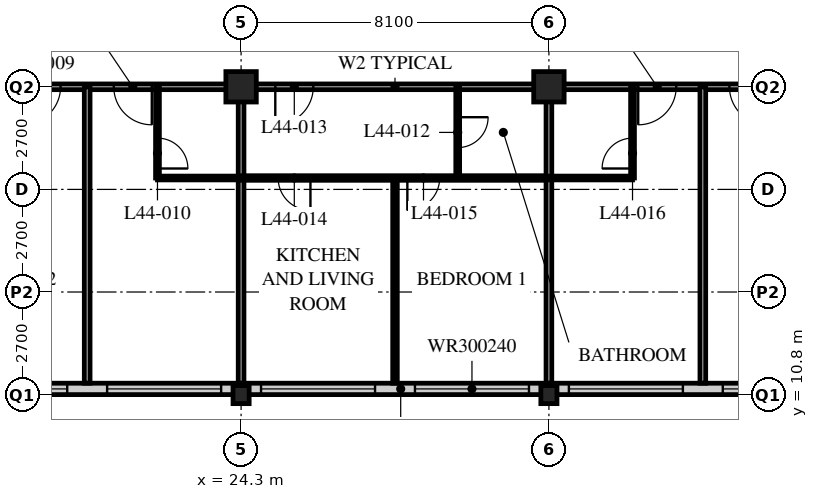
"""IFC4 building model, lengths in metres.
Left out: names, types, materials, properties, quantities, classifications, styles, units other than length and angle.
Written with IfcOpenShell. Run it as: python <this file> out.ifc"""

import sys

from ifc_helpers import new_model, si_unit, direction, frame, frame_2d, origin, origin_2d, place, context, subcontext, project, spatial, rectangle, hollow_rectangle, i_section, extrude, element, fill, save


model = new_model("IFC4")
c1 = context("Model", 3, precision=1e-05, world=origin(), true_north=direction((0.0, 1.0)))
c2 = subcontext(c1, "Body", "Model", "MODEL_VIEW")
j1 = project(units=[si_unit("LENGTHUNIT", "METRE"), si_unit("PLANEANGLEUNIT", "RADIAN")], contexts=[c1])
p1 = place(None, origin())
s1 = spatial("IfcSite", under=j1, at=p1, CompositionType="ELEMENT")
p2 = place(p1, origin())
s2 = spatial("IfcBuilding", under=s1, at=p2, CompositionType="ELEMENT")
p3 = place(p2, frame((0.0, 0.0, 174.0)))
s3 = spatial("IfcBuildingStorey", under=s2, at=p3, CompositionType="ELEMENT", Elevation=174.0)
p4 = place(p3, frame((24.3, 10.8, 0.0), z_axis=(0.0, 0.0, 1.0), x_axis=(1.0, 0.0, 0.0)))
e1 = element("IfcColumn", 1, at=p4, inside=s3, PredefinedType="COLUMN", context=c2, shape_type="SweptSolid", body=[
    extrude(i_section(OverallWidth=0.424, OverallDepth=0.475, WebThickness=0.048, FlangeThickness=0.077, FilletRadius=0.015, at=origin_2d()), origin(), (0.0, 0.0, 1.0), 3.6),
])
p5 = place(p3, frame((24.3, 18.9, 0.0), z_axis=(0.0, 0.0, 1.0), x_axis=(1.0, 0.0, 0.0)))
e2 = element("IfcColumn", 2, at=p5, inside=s3, PredefinedType="COLUMN", context=c2, shape_type="SweptSolid", body=[
    extrude(hollow_rectangle(XDim=0.8, YDim=0.8, WallThickness=0.08, at=origin_2d()), origin(), (0.0, 0.0, 1.0), 3.6),
])
p6 = place(p3, frame((32.4, 10.8, 0.0), z_axis=(0.0, 0.0, 1.0), x_axis=(1.0, 0.0, 0.0)))
e3 = element("IfcColumn", 3, at=p6, inside=s3, PredefinedType="COLUMN", context=c2, shape_type="SweptSolid", body=[
    extrude(i_section(OverallWidth=0.424, OverallDepth=0.475, WebThickness=0.048, FlangeThickness=0.077, FilletRadius=0.015, at=origin_2d()), origin(), (0.0, 0.0, 1.0), 3.6),
])
p7 = place(p3, frame((32.4, 18.9, 0.0), z_axis=(0.0, 0.0, 1.0), x_axis=(1.0, 0.0, 0.0)))
e4 = element("IfcColumn", 4, at=p7, inside=s3, PredefinedType="COLUMN", context=c2, shape_type="SweptSolid", body=[
    extrude(hollow_rectangle(XDim=0.8, YDim=0.8, WallThickness=0.08, at=origin_2d()), origin(), (0.0, 0.0, 1.0), 3.6),
])
p8 = place(p3, frame((8.4, 10.95, 0.0), z_axis=(0.0, 0.0, 1.0), x_axis=(1.0, 0.0, 0.0)))
e5 = element("IfcWall", 5, at=p8, inside=s3, PredefinedType="SOLIDWALL", context=c2, shape_type="SweptSolid", body=[
    extrude(rectangle(XDim=40.2, YDim=0.3, at=frame_2d((20.1, 0.0))), origin(), (0.0, 0.0, 1.0), 3.39),
])
p9 = place(p8, frame((0.225, 0.0, 0.6)))
e6 = element("IfcOpeningElement", 6, at=p9, cuts=e5, PredefinedType="OPENING", context=c2, shape_type="SweptSolid", body=[
    extrude(rectangle(XDim=3.0, YDim=2.4, at=frame_2d((1.5, 1.2))), frame((0.0, 0.16, 0.0), z_axis=(0.0, -1.0, 0.0), x_axis=(1.0, 0.0, 0.0)), (0.0, 0.0, 1.0), 0.32),
])
p10 = place(p8, frame((4.275, 0.0, 0.6)))
e7 = element("IfcOpeningElement", 7, at=p10, cuts=e5, PredefinedType="OPENING", context=c2, shape_type="SweptSolid", body=[
    extrude(rectangle(XDim=3.0, YDim=2.4, at=frame_2d((1.5, 1.2))), frame((0.0, 0.16, 0.0), z_axis=(0.0, -1.0, 0.0), x_axis=(1.0, 0.0, 0.0)), (0.0, 0.0, 1.0), 0.32),
])
p11 = place(p8, frame((8.325, 0.0, 0.6)))
e8 = element("IfcOpeningElement", 8, at=p11, cuts=e5, PredefinedType="OPENING", context=c2, shape_type="SweptSolid", body=[
    extrude(rectangle(XDim=3.0, YDim=2.4, at=frame_2d((1.5, 1.2))), frame((0.0, 0.16, 0.0), z_axis=(0.0, -1.0, 0.0), x_axis=(1.0, 0.0, 0.0)), (0.0, 0.0, 1.0), 0.32),
])
p12 = place(p8, frame((12.375, 0.0, 0.6)))
e9 = element("IfcOpeningElement", 9, at=p12, cuts=e5, PredefinedType="OPENING", context=c2, shape_type="SweptSolid", body=[
    extrude(rectangle(XDim=3.0, YDim=2.4, at=frame_2d((1.5, 1.2))), frame((0.0, 0.16, 0.0), z_axis=(0.0, -1.0, 0.0), x_axis=(1.0, 0.0, 0.0)), (0.0, 0.0, 1.0), 0.32),
])
p13 = place(p8, frame((16.425, 0.0, 0.6)))
e10 = element("IfcOpeningElement", 10, at=p13, cuts=e5, PredefinedType="OPENING", context=c2, shape_type="SweptSolid", body=[
    extrude(rectangle(XDim=3.0, YDim=2.4, at=frame_2d((1.5, 1.2))), frame((0.0, 0.16, 0.0), z_axis=(0.0, -1.0, 0.0), x_axis=(1.0, 0.0, 0.0)), (0.0, 0.0, 1.0), 0.32),
])
p14 = place(p8, frame((20.475, 0.0, 0.6)))
e11 = element("IfcOpeningElement", 11, at=p14, cuts=e5, PredefinedType="OPENING", context=c2, shape_type="SweptSolid", body=[
    extrude(rectangle(XDim=3.0, YDim=2.4, at=frame_2d((1.5, 1.2))), frame((0.0, 0.16, 0.0), z_axis=(0.0, -1.0, 0.0), x_axis=(1.0, 0.0, 0.0)), (0.0, 0.0, 1.0), 0.32),
])
p15 = place(p8, frame((24.525, 0.0, 0.6)))
e12 = element("IfcOpeningElement", 12, at=p15, cuts=e5, PredefinedType="OPENING", context=c2, shape_type="SweptSolid", body=[
    extrude(rectangle(XDim=3.0, YDim=2.4, at=frame_2d((1.5, 1.2))), frame((0.0, 0.16, 0.0), z_axis=(0.0, -1.0, 0.0), x_axis=(1.0, 0.0, 0.0)), (0.0, 0.0, 1.0), 0.32),
])
p16 = place(p8, frame((28.575, 0.0, 0.6)))
e13 = element("IfcOpeningElement", 13, at=p16, cuts=e5, PredefinedType="OPENING", context=c2, shape_type="SweptSolid", body=[
    extrude(rectangle(XDim=3.0, YDim=2.4, at=frame_2d((1.5, 1.2))), frame((0.0, 0.16, 0.0), z_axis=(0.0, -1.0, 0.0), x_axis=(1.0, 0.0, 0.0)), (0.0, 0.0, 1.0), 0.32),
])
p17 = place(p8, frame((32.625, 0.0, 0.6)))
e14 = element("IfcOpeningElement", 14, at=p17, cuts=e5, PredefinedType="OPENING", context=c2, shape_type="SweptSolid", body=[
    extrude(rectangle(XDim=3.0, YDim=2.4, at=frame_2d((1.5, 1.2))), frame((0.0, 0.16, 0.0), z_axis=(0.0, -1.0, 0.0), x_axis=(1.0, 0.0, 0.0)), (0.0, 0.0, 1.0), 0.32),
])
p18 = place(p8, frame((36.675, 0.0, 0.6)))
e15 = element("IfcOpeningElement", 15, at=p18, cuts=e5, PredefinedType="OPENING", context=c2, shape_type="SweptSolid", body=[
    extrude(rectangle(XDim=3.0, YDim=2.4, at=frame_2d((1.5, 1.2))), frame((0.0, 0.16, 0.0), z_axis=(0.0, -1.0, 0.0), x_axis=(1.0, 0.0, 0.0)), (0.0, 0.0, 1.0), 0.32),
])
p19 = place(p3, frame((12.15, 18.9, 0.0), z_axis=(0.0, 0.0, 1.0), x_axis=(1.0, 0.0, 0.0)))
e16 = element("IfcWall", 16, at=p19, inside=s3, PredefinedType="PARTITIONING", context=c2, shape_type="SweptSolid", body=[
    extrude(rectangle(XDim=32.4, YDim=0.15, at=frame_2d((16.2, 0.0))), origin(), (0.0, 0.0, 1.0), 2.778),
])
p20 = place(p19, frame((6.4, 0.0, 0.0)))
e17 = element("IfcOpeningElement", 17, at=p20, cuts=e16, PredefinedType="OPENING", context=c2, shape_type="SweptSolid", body=[
    extrude(rectangle(XDim=1.0, YDim=2.1, at=frame_2d((0.5, 1.05))), frame((0.0, 0.085, 0.0), z_axis=(0.0, -1.0, 0.0), x_axis=(1.0, 0.0, 0.0)), (0.0, 0.0, 1.0), 0.17),
])
p21 = place(p19, frame((8.8, 0.0, 0.0)))
e18 = element("IfcOpeningElement", 18, at=p21, cuts=e16, PredefinedType="OPENING", context=c2, shape_type="SweptSolid", body=[
    extrude(rectangle(XDim=1.0, YDim=2.1, at=frame_2d((0.5, 1.05))), frame((0.0, 0.085, 0.0), z_axis=(0.0, -1.0, 0.0), x_axis=(1.0, 0.0, 0.0)), (0.0, 0.0, 1.0), 0.17),
])
p22 = place(p19, frame((13.05, 0.0, 0.0)))
e19 = element("IfcOpeningElement", 19, at=p22, cuts=e16, PredefinedType="OPENING", context=c2, shape_type="SweptSolid", body=[
    extrude(rectangle(XDim=1.0, YDim=2.1, at=frame_2d((0.5, 1.05))), frame((0.0, 0.085, 0.0), z_axis=(0.0, -1.0, 0.0), x_axis=(1.0, 0.0, 0.0)), (0.0, 0.0, 1.0), 0.17),
])
p23 = place(p19, frame((22.6, 0.0, 0.0)))
e20 = element("IfcOpeningElement", 20, at=p23, cuts=e16, PredefinedType="OPENING", context=c2, shape_type="SweptSolid", body=[
    extrude(rectangle(XDim=1.0, YDim=2.1, at=frame_2d((0.5, 1.05))), frame((0.0, 0.085, 0.0), z_axis=(0.0, -1.0, 0.0), x_axis=(1.0, 0.0, 0.0)), (0.0, 0.0, 1.0), 0.17),
])
p24 = place(p19, frame((25.0, 0.0, 0.0)))
e21 = element("IfcOpeningElement", 21, at=p24, cuts=e16, PredefinedType="OPENING", context=c2, shape_type="SweptSolid", body=[
    extrude(rectangle(XDim=1.0, YDim=2.1, at=frame_2d((0.5, 1.05))), frame((0.0, 0.085, 0.0), z_axis=(0.0, -1.0, 0.0), x_axis=(1.0, 0.0, 0.0)), (0.0, 0.0, 1.0), 0.17),
])
p25 = place(p19, frame((1.525, 0.0, 0.0)))
e22 = element("IfcOpeningElement", 22, at=p25, cuts=e16, PredefinedType="OPENING", context=c2, shape_type="SweptSolid", body=[
    extrude(rectangle(XDim=1.0, YDim=2.1, at=frame_2d((0.5, 1.05))), frame((0.0, 0.085, 0.0), z_axis=(0.0, -1.0, 0.0), x_axis=(1.0, 0.0, 0.0)), (0.0, 0.0, 1.0), 0.17),
])
p26 = place(p19, frame((29.875, 0.0, 0.0)))
e23 = element("IfcOpeningElement", 23, at=p26, cuts=e16, PredefinedType="OPENING", context=c2, shape_type="SweptSolid", body=[
    extrude(rectangle(XDim=1.0, YDim=2.1, at=frame_2d((0.5, 1.05))), frame((0.0, 0.085, 0.0), z_axis=(0.0, -1.0, 0.0), x_axis=(1.0, 0.0, 0.0)), (0.0, 0.0, 1.0), 0.17),
])
p27 = place(p3, frame((20.25, 18.9, 0.0), z_axis=(0.0, 0.0, 1.0), x_axis=(0.0, -1.0, 0.0)))
e24 = element("IfcWall", 24, at=p27, inside=s3, PredefinedType="PARTITIONING", context=c2, shape_type="SweptSolid", body=[
    extrude(rectangle(XDim=7.8, YDim=0.15, at=frame_2d((3.9, 0.0))), origin(), (0.0, 0.0, 1.0), 3.39),
])
p28 = place(p3, frame((22.1, 16.5, 0.0), z_axis=(0.0, 0.0, 1.0), x_axis=(1.0, 0.0, 0.0)))
e25 = element("IfcWall", 25, at=p28, inside=s3, PredefinedType="PARTITIONING", context=c2, shape_type="SweptSolid", body=[
    extrude(rectangle(XDim=2.2, YDim=0.1, at=frame_2d((1.1, 0.0))), origin(), (0.0, 0.0, 1.0), 3.39),
])
p29 = place(p3, frame((22.1, 18.9, 0.0), z_axis=(0.0, 0.0, 1.0), x_axis=(0.0, -1.0, 0.0)))
e26 = element("IfcWall", 26, at=p29, inside=s3, PredefinedType="PARTITIONING", context=c2, shape_type="SweptSolid", body=[
    extrude(rectangle(XDim=2.4, YDim=0.1, at=frame_2d((1.2, 0.0))), origin(), (0.0, 0.0, 1.0), 3.39),
])
p30 = place(p29, frame((1.35, 0.0, 0.0)))
e27 = element("IfcOpeningElement", 27, at=p30, cuts=e26, PredefinedType="OPENING", context=c2, shape_type="SweptSolid", body=[
    extrude(rectangle(XDim=0.8, YDim=2.1, at=frame_2d((0.4, 1.05))), frame((0.0, 0.06, 0.0), z_axis=(0.0, -1.0, 0.0), x_axis=(1.0, 0.0, 0.0)), (0.0, 0.0, 1.0), 0.12),
])
p31 = place(p3, frame((24.3, 18.9, 0.0), z_axis=(0.0, 0.0, 1.0), x_axis=(0.0, -1.0, 0.0)))
e28 = element("IfcWall", 28, at=p31, inside=s3, PredefinedType="PARTITIONING", context=c2, shape_type="SweptSolid", body=[
    extrude(rectangle(XDim=7.8, YDim=0.15, at=frame_2d((3.9, 0.0))), origin(), (0.0, 0.0, 1.0), 2.778),
])
p32 = place(p3, frame((24.3, 16.5, 0.0), z_axis=(0.0, 0.0, 1.0), x_axis=(1.0, 0.0, 0.0)))
e29 = element("IfcWall", 29, at=p32, inside=s3, PredefinedType="PARTITIONING", context=c2, shape_type="SweptSolid", body=[
    extrude(rectangle(XDim=8.1, YDim=0.12, at=frame_2d((4.05, 0.0))), origin(), (0.0, 0.0, 1.0), 3.39),
])
p33 = place(p32, frame((0.975, 0.0, 0.0)))
e30 = element("IfcOpeningElement", 30, at=p33, cuts=e29, PredefinedType="OPENING", context=c2, shape_type="SweptSolid", body=[
    extrude(rectangle(XDim=0.85, YDim=2.1, at=frame_2d((0.425, 1.05))), frame((0.0, 0.07, 0.0), z_axis=(0.0, -1.0, 0.0), x_axis=(1.0, 0.0, 0.0)), (0.0, 0.0, 1.0), 0.14),
])
p34 = place(p32, frame((4.375, 0.0, 0.0)))
e31 = element("IfcOpeningElement", 31, at=p34, cuts=e29, PredefinedType="OPENING", context=c2, shape_type="SweptSolid", body=[
    extrude(rectangle(XDim=0.85, YDim=2.1, at=frame_2d((0.425, 1.05))), frame((0.0, 0.07, 0.0), z_axis=(0.0, -1.0, 0.0), x_axis=(1.0, 0.0, 0.0)), (0.0, 0.0, 1.0), 0.14),
])
p35 = place(p3, frame((30.0, 18.9, 0.0), z_axis=(0.0, 0.0, 1.0), x_axis=(0.0, -1.0, 0.0)))
e32 = element("IfcWall", 32, at=p35, inside=s3, PredefinedType="PARTITIONING", context=c2, shape_type="SweptSolid", body=[
    extrude(rectangle(XDim=2.4, YDim=0.1, at=frame_2d((1.2, 0.0))), origin(), (0.0, 0.0, 1.0), 3.39),
])
p36 = place(p35, frame((0.8, 0.0, 0.0)))
e33 = element("IfcOpeningElement", 33, at=p36, cuts=e32, PredefinedType="OPENING", context=c2, shape_type="SweptSolid", body=[
    extrude(rectangle(XDim=0.8, YDim=2.1, at=frame_2d((0.4, 1.05))), frame((0.0, 0.06, 0.0), z_axis=(0.0, -1.0, 0.0), x_axis=(1.0, 0.0, 0.0)), (0.0, 0.0, 1.0), 0.12),
])
p37 = place(p3, frame((28.35, 16.5, 0.0), z_axis=(0.0, 0.0, 1.0), x_axis=(0.0, -1.0, 0.0)))
e34 = element("IfcWall", 34, at=p37, inside=s3, PredefinedType="PARTITIONING", context=c2, shape_type="SweptSolid", body=[
    extrude(rectangle(XDim=5.4, YDim=0.12, at=frame_2d((2.7, 0.0))), origin(), (0.0, 0.0, 1.0), 3.39),
])
p38 = place(p3, frame((32.4, 18.9, 0.0), z_axis=(0.0, 0.0, 1.0), x_axis=(0.0, -1.0, 0.0)))
e35 = element("IfcWall", 35, at=p38, inside=s3, PredefinedType="PARTITIONING", context=c2, shape_type="SweptSolid", body=[
    extrude(rectangle(XDim=7.8, YDim=0.15, at=frame_2d((3.9, 0.0))), origin(), (0.0, 0.0, 1.0), 2.778),
])
p39 = place(p3, frame((32.4, 16.5, 0.0), z_axis=(0.0, 0.0, 1.0), x_axis=(1.0, 0.0, 0.0)))
e36 = element("IfcWall", 36, at=p39, inside=s3, PredefinedType="PARTITIONING", context=c2, shape_type="SweptSolid", body=[
    extrude(rectangle(XDim=2.2, YDim=0.1, at=frame_2d((1.1, 0.0))), origin(), (0.0, 0.0, 1.0), 3.39),
])
p40 = place(p3, frame((34.6, 18.9, 0.0), z_axis=(0.0, 0.0, 1.0), x_axis=(0.0, -1.0, 0.0)))
e37 = element("IfcWall", 37, at=p40, inside=s3, PredefinedType="PARTITIONING", context=c2, shape_type="SweptSolid", body=[
    extrude(rectangle(XDim=2.4, YDim=0.1, at=frame_2d((1.2, 0.0))), origin(), (0.0, 0.0, 1.0), 3.39),
])
p41 = place(p40, frame((1.35, 0.0, 0.0)))
e38 = element("IfcOpeningElement", 38, at=p41, cuts=e37, PredefinedType="OPENING", context=c2, shape_type="SweptSolid", body=[
    extrude(rectangle(XDim=0.8, YDim=2.1, at=frame_2d((0.4, 1.05))), frame((0.0, 0.06, 0.0), z_axis=(0.0, -1.0, 0.0), x_axis=(1.0, 0.0, 0.0)), (0.0, 0.0, 1.0), 0.12),
])
p42 = place(p3, frame((36.45, 18.9, 0.0), z_axis=(0.0, 0.0, 1.0), x_axis=(0.0, -1.0, 0.0)))
e39 = element("IfcWall", 39, at=p42, inside=s3, PredefinedType="PARTITIONING", context=c2, shape_type="SweptSolid", body=[
    extrude(rectangle(XDim=7.8, YDim=0.15, at=frame_2d((3.9, 0.0))), origin(), (0.0, 0.0, 1.0), 3.39),
])
p43 = place(p11, origin())
e40 = element("IfcWindow", 40, at=p43, inside=s3, PartitioningType="SINGLE_PANEL", PredefinedType="WINDOW", context=c2, shape_type="SweptSolid", body=[
    extrude(rectangle(XDim=3.0, YDim=2.4, at=frame_2d((1.5, 1.2))), frame((0.0, 0.03, 0.0), z_axis=(0.0, -1.0, 0.0), x_axis=(1.0, 0.0, 0.0)), (0.0, 0.0, 1.0), 0.06),
])
fill(e8, e40)
p44 = place(p12, origin())
e41 = element("IfcWindow", 41, at=p44, inside=s3, PartitioningType="SINGLE_PANEL", PredefinedType="WINDOW", context=c2, shape_type="SweptSolid", body=[
    extrude(rectangle(XDim=3.0, YDim=2.4, at=frame_2d((1.5, 1.2))), frame((0.0, 0.03, 0.0), z_axis=(0.0, -1.0, 0.0), x_axis=(1.0, 0.0, 0.0)), (0.0, 0.0, 1.0), 0.06),
])
fill(e9, e41)
p45 = place(p13, origin())
e42 = element("IfcWindow", 42, at=p45, inside=s3, PartitioningType="SINGLE_PANEL", PredefinedType="WINDOW", context=c2, shape_type="SweptSolid", body=[
    extrude(rectangle(XDim=3.0, YDim=2.4, at=frame_2d((1.5, 1.2))), frame((0.0, 0.03, 0.0), z_axis=(0.0, -1.0, 0.0), x_axis=(1.0, 0.0, 0.0)), (0.0, 0.0, 1.0), 0.06),
])
fill(e10, e42)
p46 = place(p14, origin())
e43 = element("IfcWindow", 43, at=p46, inside=s3, PartitioningType="SINGLE_PANEL", PredefinedType="WINDOW", context=c2, shape_type="SweptSolid", body=[
    extrude(rectangle(XDim=3.0, YDim=2.4, at=frame_2d((1.5, 1.2))), frame((0.0, 0.03, 0.0), z_axis=(0.0, -1.0, 0.0), x_axis=(1.0, 0.0, 0.0)), (0.0, 0.0, 1.0), 0.06),
])
fill(e11, e43)
p47 = place(p15, origin())
e44 = element("IfcWindow", 44, at=p47, inside=s3, PartitioningType="SINGLE_PANEL", PredefinedType="WINDOW", context=c2, shape_type="SweptSolid", body=[
    extrude(rectangle(XDim=3.0, YDim=2.4, at=frame_2d((1.5, 1.2))), frame((0.0, 0.03, 0.0), z_axis=(0.0, -1.0, 0.0), x_axis=(1.0, 0.0, 0.0)), (0.0, 0.0, 1.0), 0.06),
])
fill(e12, e44)
p48 = place(p16, origin())
e45 = element("IfcWindow", 45, at=p48, inside=s3, PartitioningType="SINGLE_PANEL", PredefinedType="WINDOW", context=c2, shape_type="SweptSolid", body=[
    extrude(rectangle(XDim=3.0, YDim=2.4, at=frame_2d((1.5, 1.2))), frame((0.0, 0.03, 0.0), z_axis=(0.0, -1.0, 0.0), x_axis=(1.0, 0.0, 0.0)), (0.0, 0.0, 1.0), 0.06),
])
fill(e13, e45)
p49 = place(p20, origin())
e46 = element("IfcDoor", 46, at=p49, inside=s3, OperationType="SINGLE_SWING_RIGHT", PredefinedType="DOOR", context=c2, shape_type="SweptSolid", body=[
    extrude(rectangle(XDim=1.0, YDim=2.1, at=frame_2d((0.5, 1.05))), frame((0.0, 0.025, 0.0), z_axis=(0.0, -1.0, 0.0), x_axis=(1.0, 0.0, 0.0)), (0.0, 0.0, 1.0), 0.05),
])
fill(e17, e46)
p50 = place(p30, origin())
e47 = element("IfcDoor", 47, at=p50, inside=s3, OperationType="SINGLE_SWING_RIGHT", PredefinedType="DOOR", context=c2, shape_type="SweptSolid", body=[
    extrude(rectangle(XDim=0.8, YDim=2.1, at=frame_2d((0.4, 1.05))), frame((0.0, 0.025, 0.0), z_axis=(0.0, -1.0, 0.0), x_axis=(1.0, 0.0, 0.0)), (0.0, 0.0, 1.0), 0.05),
])
fill(e27, e47)
p51 = place(p21, origin())
e48 = element("IfcDoor", 48, at=p51, inside=s3, OperationType="SINGLE_SWING_LEFT", PredefinedType="DOOR", context=c2, shape_type="SweptSolid", body=[
    extrude(rectangle(XDim=1.0, YDim=2.1, at=frame_2d((0.5, 1.05))), frame((0.0, 0.025, 0.0), z_axis=(0.0, -1.0, 0.0), x_axis=(1.0, 0.0, 0.0)), (0.0, 0.0, 1.0), 0.05),
])
fill(e18, e48)
p52 = place(p36, origin())
e49 = element("IfcDoor", 49, at=p52, inside=s3, OperationType="SINGLE_SWING_LEFT", PredefinedType="DOOR", context=c2, shape_type="SweptSolid", body=[
    extrude(rectangle(XDim=0.8, YDim=2.1, at=frame_2d((0.4, 1.05))), frame((0.0, 0.025, 0.0), z_axis=(0.0, -1.0, 0.0), x_axis=(1.0, 0.0, 0.0)), (0.0, 0.0, 1.0), 0.05),
])
fill(e33, e49)
p53 = place(p22, origin())
e50 = element("IfcDoor", 50, at=p53, inside=s3, OperationType="SINGLE_SWING_RIGHT", PredefinedType="DOOR", context=c2, shape_type="SweptSolid", body=[
    extrude(rectangle(XDim=1.0, YDim=2.1, at=frame_2d((0.5, 1.05))), frame((0.0, 0.025, 0.0), z_axis=(0.0, -1.0, 0.0), x_axis=(1.0, 0.0, 0.0)), (0.0, 0.0, 1.0), 0.05),
])
fill(e19, e50)
p54 = place(p33, origin())
e51 = element("IfcDoor", 51, at=p54, inside=s3, OperationType="SINGLE_SWING_LEFT", PredefinedType="DOOR", context=c2, shape_type="SweptSolid", body=[
    extrude(rectangle(XDim=0.85, YDim=2.1, at=frame_2d((0.425, 1.05))), frame((0.0, 0.025, 0.0), z_axis=(0.0, -1.0, 0.0), x_axis=(1.0, 0.0, 0.0)), (0.0, 0.0, 1.0), 0.05),
])
fill(e30, e51)
p55 = place(p34, origin())
e52 = element("IfcDoor", 52, at=p55, inside=s3, OperationType="SINGLE_SWING_RIGHT", PredefinedType="DOOR", context=c2, shape_type="SweptSolid", body=[
    extrude(rectangle(XDim=0.85, YDim=2.1, at=frame_2d((0.425, 1.05))), frame((0.0, 0.025, 0.0), z_axis=(0.0, -1.0, 0.0), x_axis=(1.0, 0.0, 0.0)), (0.0, 0.0, 1.0), 0.05),
])
fill(e31, e52)
p56 = place(p41, origin())
e53 = element("IfcDoor", 53, at=p56, inside=s3, OperationType="SINGLE_SWING_LEFT", PredefinedType="DOOR", context=c2, shape_type="SweptSolid", body=[
    extrude(rectangle(XDim=0.8, YDim=2.1, at=frame_2d((0.4, 1.05))), frame((0.0, 0.025, 0.0), z_axis=(0.0, -1.0, 0.0), x_axis=(1.0, 0.0, 0.0)), (0.0, 0.0, 1.0), 0.05),
])
fill(e38, e53)
p57 = place(p23, origin())
e54 = element("IfcDoor", 54, at=p57, inside=s3, OperationType="SINGLE_SWING_RIGHT", PredefinedType="DOOR", context=c2, shape_type="SweptSolid", body=[
    extrude(rectangle(XDim=1.0, YDim=2.1, at=frame_2d((0.5, 1.05))), frame((0.0, 0.025, 0.0), z_axis=(0.0, -1.0, 0.0), x_axis=(1.0, 0.0, 0.0)), (0.0, 0.0, 1.0), 0.05),
])
fill(e20, e54)
p58 = place(p24, origin())
e55 = element("IfcDoor", 55, at=p58, inside=s3, OperationType="SINGLE_SWING_LEFT", PredefinedType="DOOR", context=c2, shape_type="SweptSolid", body=[
    extrude(rectangle(XDim=1.0, YDim=2.1, at=frame_2d((0.5, 1.05))), frame((0.0, 0.025, 0.0), z_axis=(0.0, -1.0, 0.0), x_axis=(1.0, 0.0, 0.0)), (0.0, 0.0, 1.0), 0.05),
])
fill(e21, e55)
save(model, sys.argv[1])
